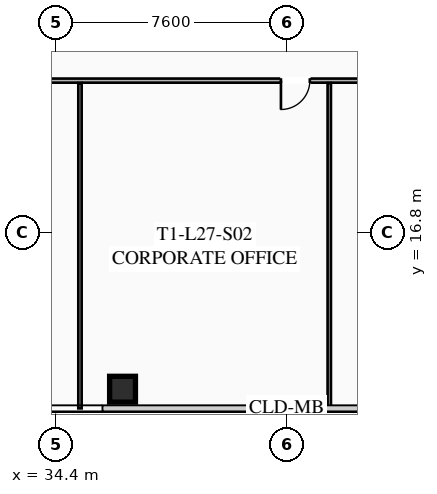
"""IFC4 building model, lengths in metres.
Left out: names, types, materials, properties, quantities, classifications, styles, units other than length and angle.
Written with IfcOpenShell. Run it as: python <this file> out.ifc"""

import sys

from ifc_helpers import new_model, si_unit, direction, frame, frame_2d, origin, origin_2d, place, context, subcontext, project, spatial, rectangle, hollow_rectangle, extrude, element, fill, save


model = new_model("IFC4")
c1 = context("Model", 3, precision=1e-05, world=origin(), true_north=direction((0.0, 1.0)))
c2 = subcontext(c1, "Body", "Model", "MODEL_VIEW")
j1 = project(units=[si_unit("LENGTHUNIT", "METRE"), si_unit("PLANEANGLEUNIT", "RADIAN")], contexts=[c1])
p1 = place(None, origin())
s1 = spatial("IfcSite", under=j1, at=p1, CompositionType="ELEMENT")
p2 = place(p1, origin())
s2 = spatial("IfcBuilding", under=s1, at=p2, CompositionType="ELEMENT")
p3 = place(p2, frame((0.0, 0.0, 102.7)))
s3 = spatial("IfcBuildingStorey", under=s2, at=p3, CompositionType="ELEMENT", Elevation=102.7)
p4 = place(p3, frame((36.6, 11.65, 0.0), z_axis=(0.0, 0.0, 1.0), x_axis=(1.0, 0.0, 0.0)))
e1 = element("IfcColumn", 1, at=p4, inside=s3, PredefinedType="COLUMN", context=c2, shape_type="SweptSolid", body=[
    extrude(hollow_rectangle(XDim=0.85, YDim=0.85, WallThickness=0.035, at=origin_2d()), origin(), (0.0, 0.0, 1.0), 3.35),
])
p5 = place(p3, frame((51.35, 21.8, 0.0), z_axis=(0.0, 0.0, 1.0), x_axis=(-1.0, 0.0, 0.0)))
e2 = element("IfcWall", 2, at=p5, inside=s3, PredefinedType="PARTITIONING", context=c2, shape_type="SweptSolid", body=[
    extrude(rectangle(XDim=27.3, YDim=0.135, at=frame_2d((13.65, 0.0))), origin(), (0.0, 0.0, 1.0), 2.703),
])
p6 = place(p5, frame((25.97, 0.0, 0.0)))
e3 = element("IfcOpeningElement", 3, at=p6, cuts=e2, PredefinedType="OPENING", context=c2, shape_type="SweptSolid", body=[
    extrude(rectangle(XDim=0.95, YDim=2.05, at=frame_2d((0.475, 1.025))), frame((0.0, 0.077, 0.0), z_axis=(0.0, -1.0, 0.0), x_axis=(1.0, 0.0, 0.0)), (0.0, 0.0, 1.0), 0.155),
])
p7 = place(p5, frame((8.59, 0.0, 0.0)))
e4 = element("IfcOpeningElement", 4, at=p7, cuts=e2, PredefinedType="OPENING", context=c2, shape_type="SweptSolid", body=[
    extrude(rectangle(XDim=0.95, YDim=2.05, at=frame_2d((0.475, 1.025))), frame((0.0, 0.077, 0.0), z_axis=(0.0, -1.0, 0.0), x_axis=(1.0, 0.0, 0.0)), (0.0, 0.0, 1.0), 0.155),
])
p8 = place(p5, frame((4.8, 0.0, 0.0)))
e5 = element("IfcOpeningElement", 5, at=p8, cuts=e2, PredefinedType="OPENING", context=c2, shape_type="SweptSolid", body=[
    extrude(rectangle(XDim=0.95, YDim=2.05, at=frame_2d((0.475, 1.025))), frame((0.0, 0.077, 0.0), z_axis=(0.0, -1.0, 0.0), x_axis=(1.0, 0.0, 0.0)), (0.0, 0.0, 1.0), 0.155),
])
for number, where, z_axis, x_axis in (
    (6, (35.2, 11.02, 0.0), (0.0, 0.0, 1.0), (0.0, 1.0, 0.0)),
    (7, (43.4, 11.02, 0.0), (0.0, 0.0, 1.0), (0.0, 1.0, 0.0)),
):
    element("IfcWall", number, at=place(p3, frame(where, z_axis=z_axis, x_axis=x_axis)), inside=s3, PredefinedType="PARTITIONING", context=c2, shape_type="SweptSolid", body=[
        extrude(rectangle(XDim=10.7, YDim=0.11, at=frame_2d((5.35, 0.0))), origin(), (0.0, 0.0, 1.0), 2.703),
    ])
p9 = place(p7, origin())
e8 = element("IfcDoor", 8, at=p9, inside=s3, OperationType="SINGLE_SWING_RIGHT", PredefinedType="DOOR", context=c2, shape_type="SweptSolid", body=[
    extrude(rectangle(XDim=0.95, YDim=2.05, at=frame_2d((0.475, 1.025))), frame((0.0, 0.025, 0.0), z_axis=(0.0, -1.0, 0.0), x_axis=(1.0, 0.0, 0.0)), (0.0, 0.0, 1.0), 0.05),
])
fill(e4, e8)
save(model, sys.argv[1])
